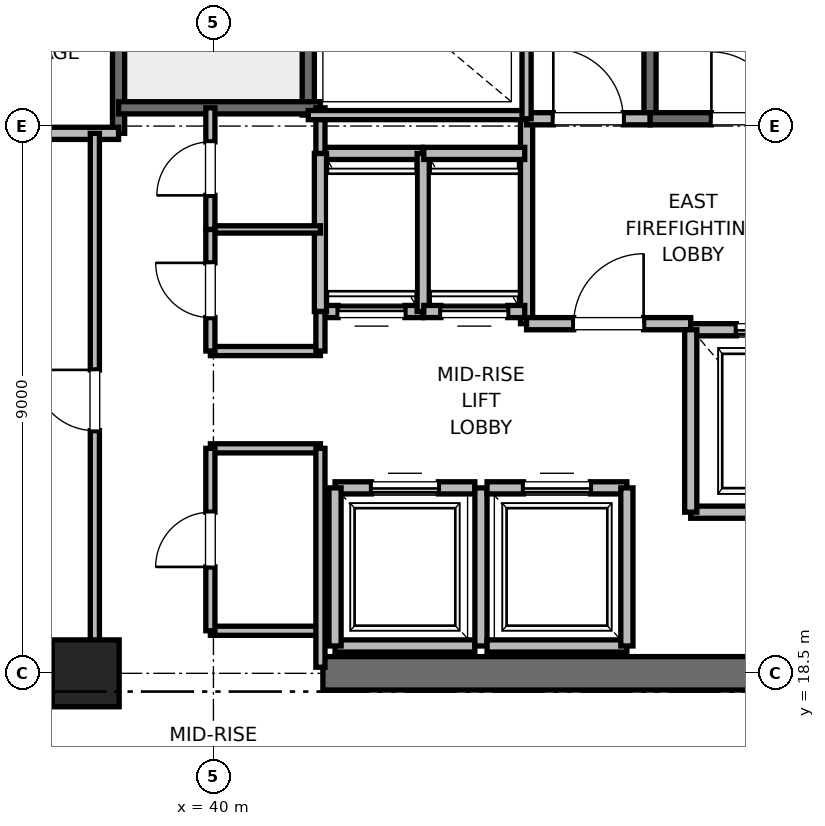
"""IFC4 building model, lengths in metres.
Left out: names, types, materials, properties, quantities, classifications, styles, units other than length and angle.
Written with IfcOpenShell. Run it as: python <this file> out.ifc"""

import sys

from ifc_helpers import new_model, si_unit, direction, frame, frame_2d, origin, origin_2d, place, context, subcontext, project, spatial, rectangle, extrude, element, fill, save


model = new_model("IFC4")
c1 = context("Model", 3, precision=1e-05, world=origin(), true_north=direction((0.0, 1.0)))
c2 = subcontext(c1, "Body", "Model", "MODEL_VIEW")
j1 = project(units=[si_unit("LENGTHUNIT", "METRE"), si_unit("PLANEANGLEUNIT", "RADIAN")], contexts=[c1])
p1 = place(None, origin())
s1 = spatial("IfcSite", under=j1, at=p1, CompositionType="ELEMENT")
p2 = place(p1, origin())
s2 = spatial("IfcBuilding", under=s1, at=p2, CompositionType="ELEMENT")
p3 = place(p2, frame((0.0, 0.0, 128.4)))
s3 = spatial("IfcBuildingStorey", under=s2, at=p3, CompositionType="ELEMENT", Elevation=128.4)
p4 = place(p3, frame((37.9, 18.5, 0.0), z_axis=(0.0, 0.0, 1.0), x_axis=(1.0, 0.0, 0.0)))
e1 = element("IfcColumn", 1, at=p4, inside=s3, PredefinedType="PILASTER", context=c2, shape_type="SweptSolid", body=[
    extrude(rectangle(XDim=1.1, YDim=1.1, at=origin_2d()), origin(), (0.0, 0.0, 1.0), 4.0),
])
for number, where, z_axis, x_axis in (
    (2, (29.0, 18.5, 0.0), (0.0, 0.0, 1.0), (1.0, 0.0, 0.0)),
    (3, (41.8, 18.5, 0.0), (0.0, 0.0, 1.0), (1.0, 0.0, 0.0)),
):
    element("IfcWall", number, at=place(p3, frame(where, z_axis=z_axis, x_axis=x_axis)), inside=s3, PredefinedType="SHEAR", context=c2, shape_type="SweptSolid", body=[
        extrude(rectangle(XDim=9.2, YDim=0.55, at=frame_2d((4.6, 0.0))), origin(), (0.0, 0.0, 1.0), 3.775),
    ])
p5 = place(p3, frame((47.18, 27.62, 0.0), z_axis=(0.0, 0.0, 1.0), x_axis=(0.0, 1.0, 0.0)))
e4 = element("IfcWall", 4, at=p5, inside=s3, PredefinedType="SOLIDWALL", context=c2, shape_type="SweptSolid", body=[
    extrude(rectangle(XDim=8.18, YDim=0.2, at=frame_2d((4.09, 0.0))), origin(), (0.0, 0.0, 1.0), 3.775),
])
p6 = place(p3, frame((47.18, 27.62, 0.0), z_axis=(0.0, 0.0, 1.0), x_axis=(1.0, 0.0, 0.0)))
e5 = element("IfcWall", 5, at=p6, inside=s3, PredefinedType="SOLIDWALL", context=c2, shape_type="SweptSolid", body=[
    extrude(rectangle(XDim=3.12, YDim=0.2, at=frame_2d((1.56, 0.0))), origin(), (0.0, 0.0, 1.0), 3.775),
])
p7 = place(p6, frame((1.01, 0.0, 0.0)))
e6 = element("IfcOpeningElement", 6, at=p7, cuts=e5, PredefinedType="OPENING", context=c2, shape_type="SweptSolid", body=[
    extrude(rectangle(XDim=1.1, YDim=2.15, at=frame_2d((0.55, 1.075))), frame((0.0, 0.1, 0.0), z_axis=(0.0, -1.0, 0.0), x_axis=(1.0, 0.0, 0.0)), (0.0, 0.0, 1.0), 0.2),
])
p8 = place(p3, frame((38.44, 27.38, 0.0), z_axis=(0.0, 0.0, 1.0), x_axis=(0.0, 1.0, 0.0)))
e7 = element("IfcWall", 7, at=p8, inside=s3, PredefinedType="SOLIDWALL", context=c2, shape_type="SweptSolid", body=[
    extrude(rectangle(XDim=8.87, YDim=0.2, at=frame_2d((4.435, 0.0))), origin(), (0.0, 0.0, 1.0), 3.775),
])
p9 = place(p3, frame((41.56, 27.68, 0.0), z_axis=(0.0, 0.0, 1.0), x_axis=(0.0, 1.0, 0.0)))
e8 = element("IfcWall", 8, at=p9, inside=s3, PredefinedType="SOLIDWALL", context=c2, shape_type="SweptSolid", body=[
    extrude(rectangle(XDim=8.57, YDim=0.2, at=frame_2d((4.285, 0.0))), origin(), (0.0, 0.0, 1.0), 3.775),
])
p10 = place(p3, frame((38.44, 27.8, 0.0), z_axis=(0.0, 0.0, 1.0), x_axis=(1.0, 0.0, 0.0)))
e9 = element("IfcWall", 9, at=p10, inside=s3, PredefinedType="SOLIDWALL", context=c2, shape_type="SweptSolid", body=[
    extrude(rectangle(XDim=3.32, YDim=0.2, at=frame_2d((1.66, 0.0))), origin(), (0.0, 0.0, 1.0), 3.775),
])
p11 = place(p3, frame((32.82, 27.38, 0.0), z_axis=(0.0, 0.0, 1.0), x_axis=(1.0, 0.0, 0.0)))
e10 = element("IfcWall", 10, at=p11, inside=s3, PredefinedType="PARTITIONING", context=c2, shape_type="SweptSolid", body=[
    extrude(rectangle(XDim=5.62, YDim=0.2, at=frame_2d((2.81, 0.0))), origin(), (0.0, 0.0, 1.0), 3.775),
])
p12 = place(p3, frame((45.15, 24.25, 0.0), z_axis=(0.0, 0.0, 1.0), x_axis=(0.0, 1.0, 0.0)))
e11 = element("IfcWall", 11, at=p12, inside=s3, PredefinedType="PARTITIONING", context=c2, shape_type="SweptSolid", body=[
    extrude(rectangle(XDim=3.37, YDim=0.2, at=frame_2d((1.685, 0.0))), origin(), (0.0, 0.0, 1.0), 3.775),
])
p13 = place(p3, frame((45.15, 24.25, 0.0), z_axis=(0.0, 0.0, 1.0), x_axis=(1.0, 0.0, 0.0)))
e12 = element("IfcWall", 12, at=p13, inside=s3, PredefinedType="PARTITIONING", context=c2, shape_type="SweptSolid", body=[
    extrude(rectangle(XDim=2.7, YDim=0.2, at=frame_2d((1.35, 0.0))), origin(), (0.0, 0.0, 1.0), 3.775),
])
p14 = place(p13, frame((0.775, 0.0, 0.0)))
e13 = element("IfcOpeningElement", 13, at=p14, cuts=e12, PredefinedType="OPENING", context=c2, shape_type="SweptSolid", body=[
    extrude(rectangle(XDim=1.15, YDim=2.2, at=frame_2d((0.575, 1.1))), frame((0.0, 0.1, 0.0), z_axis=(0.0, -1.0, 0.0), x_axis=(1.0, 0.0, 0.0)), (0.0, 0.0, 1.0), 0.2),
])
p15 = place(p3, frame((45.15, 27.62, 0.0), z_axis=(0.0, 0.0, 1.0), x_axis=(1.0, 0.0, 0.0)))
e14 = element("IfcWall", 14, at=p15, inside=s3, PredefinedType="PARTITIONING", context=c2, shape_type="SweptSolid", body=[
    extrude(rectangle(XDim=2.03, YDim=0.2, at=frame_2d((1.015, 0.0))), origin(), (0.0, 0.0, 1.0), 3.775),
])
p16 = place(p15, frame((0.44, 0.0, 0.0)))
e15 = element("IfcOpeningElement", 15, at=p16, cuts=e14, PredefinedType="OPENING", context=c2, shape_type="SweptSolid", body=[
    extrude(rectangle(XDim=1.15, YDim=2.2, at=frame_2d((0.575, 1.1))), frame((0.0, 0.1, 0.0), z_axis=(0.0, -1.0, 0.0), x_axis=(1.0, 0.0, 0.0)), (0.0, 0.0, 1.0), 0.2),
])
p17 = place(p3, frame((47.85, 21.15, 0.0), z_axis=(0.0, 0.0, 1.0), x_axis=(1.0, 0.0, 0.0)))
e16 = element("IfcWall", 16, at=p17, inside=s3, PredefinedType="SOLIDWALL", context=c2, shape_type="SweptSolid", body=[
    extrude(rectangle(XDim=2.6, YDim=0.2, at=frame_2d((1.3, 0.0))), origin(), (0.0, 0.0, 1.0), 3.775),
])
p18 = place(p3, frame((50.45, 24.15, 0.0), z_axis=(0.0, 0.0, 1.0), x_axis=(-1.0, 0.0, 0.0)))
e17 = element("IfcWall", 17, at=p18, inside=s3, PredefinedType="SOLIDWALL", context=c2, shape_type="SweptSolid", body=[
    extrude(rectangle(XDim=2.6, YDim=0.2, at=frame_2d((1.3, 0.0))), origin(), (0.0, 0.0, 1.0), 2.755),
])
p19 = place(p18, frame((0.75, 0.0, 0.0)))
e18 = element("IfcOpeningElement", 18, at=p19, cuts=e17, PredefinedType="OPENING", context=c2, shape_type="SweptSolid", body=[
    extrude(rectangle(XDim=1.1, YDim=2.2, at=frame_2d((0.55, 1.1))), frame((0.0, 0.1, 0.0), z_axis=(0.0, -1.0, 0.0), x_axis=(1.0, 0.0, 0.0)), (0.0, 0.0, 1.0), 0.2),
])
p20 = place(p3, frame((47.85, 24.15, 0.0), z_axis=(0.0, 0.0, 1.0), x_axis=(0.0, -1.0, 0.0)))
e19 = element("IfcWall", 19, at=p20, inside=s3, PredefinedType="SOLIDWALL", context=c2, shape_type="SweptSolid", body=[
    extrude(rectangle(XDim=3.0, YDim=0.2, at=frame_2d((1.5, 0.0))), origin(), (0.0, 0.0, 1.0), 3.775),
])
p21 = place(p3, frame((42.0, 18.95, 0.0), z_axis=(0.0, 0.0, 1.0), x_axis=(1.0, 0.0, 0.0)))
e20 = element("IfcWall", 20, at=p21, inside=s3, PredefinedType="SOLIDWALL", context=c2, shape_type="SweptSolid", body=[
    extrude(rectangle(XDim=2.3, YDim=0.2, at=frame_2d((1.15, 0.0))), origin(), (0.0, 0.0, 1.0), 2.755),
])
p22 = place(p3, frame((44.3, 21.55, 0.0), z_axis=(0.0, 0.0, 1.0), x_axis=(-1.0, 0.0, 0.0)))
e21 = element("IfcWall", 21, at=p22, inside=s3, PredefinedType="SOLIDWALL", context=c2, shape_type="SweptSolid", body=[
    extrude(rectangle(XDim=2.3, YDim=0.2, at=frame_2d((1.15, 0.0))), origin(), (0.0, 0.0, 1.0), 3.775),
])
p23 = place(p22, frame((0.6, 0.0, 0.0)))
e22 = element("IfcOpeningElement", 22, at=p23, cuts=e21, PredefinedType="OPENING", context=c2, shape_type="SweptSolid", body=[
    extrude(rectangle(XDim=1.1, YDim=2.2, at=frame_2d((0.55, 1.1))), frame((0.0, 0.1, 0.0), z_axis=(0.0, -1.0, 0.0), x_axis=(1.0, 0.0, 0.0)), (0.0, 0.0, 1.0), 0.2),
])
p24 = place(p3, frame((42.0, 21.55, 0.0), z_axis=(0.0, 0.0, 1.0), x_axis=(0.0, -1.0, 0.0)))
e23 = element("IfcWall", 23, at=p24, inside=s3, PredefinedType="SOLIDWALL", context=c2, shape_type="SweptSolid", body=[
    extrude(rectangle(XDim=2.6, YDim=0.2, at=frame_2d((1.3, 0.0))), origin(), (0.0, 0.0, 1.0), 2.755),
])
p25 = place(p3, frame((44.4, 18.95, 0.0), z_axis=(0.0, 0.0, 1.0), x_axis=(0.0, 1.0, 0.0)))
e24 = element("IfcWall", 24, at=p25, inside=s3, PredefinedType="SOLIDWALL", context=c2, shape_type="SweptSolid", body=[
    extrude(rectangle(XDim=2.6, YDim=0.2, at=frame_2d((1.3, 0.0))), origin(), (0.0, 0.0, 1.0), 3.775),
])
p26 = place(p3, frame((44.5, 18.95, 0.0), z_axis=(0.0, 0.0, 1.0), x_axis=(1.0, 0.0, 0.0)))
e25 = element("IfcWall", 25, at=p26, inside=s3, PredefinedType="SOLIDWALL", context=c2, shape_type="SweptSolid", body=[
    extrude(rectangle(XDim=2.3, YDim=0.2, at=frame_2d((1.15, 0.0))), origin(), (0.0, 0.0, 1.0), 3.775),
])
p27 = place(p3, frame((46.8, 21.55, 0.0), z_axis=(0.0, 0.0, 1.0), x_axis=(-1.0, 0.0, 0.0)))
e26 = element("IfcWall", 26, at=p27, inside=s3, PredefinedType="SOLIDWALL", context=c2, shape_type="SweptSolid", body=[
    extrude(rectangle(XDim=2.3, YDim=0.2, at=frame_2d((1.15, 0.0))), origin(), (0.0, 0.0, 1.0), 3.775),
])
p28 = place(p27, frame((0.6, 0.0, 0.0)))
e27 = element("IfcOpeningElement", 27, at=p28, cuts=e26, PredefinedType="OPENING", context=c2, shape_type="SweptSolid", body=[
    extrude(rectangle(XDim=1.1, YDim=2.2, at=frame_2d((0.55, 1.1))), frame((0.0, 0.1, 0.0), z_axis=(0.0, -1.0, 0.0), x_axis=(1.0, 0.0, 0.0)), (0.0, 0.0, 1.0), 0.2),
])
p29 = place(p3, frame((46.8, 18.95, 0.0), z_axis=(0.0, 0.0, 1.0), x_axis=(0.0, 1.0, 0.0)))
e28 = element("IfcWall", 28, at=p29, inside=s3, PredefinedType="SOLIDWALL", context=c2, shape_type="SweptSolid", body=[
    extrude(rectangle(XDim=2.6, YDim=0.2, at=frame_2d((1.3, 0.0))), origin(), (0.0, 0.0, 1.0), 3.775),
])
p30 = place(p3, frame((41.76, 24.45, 0.0), z_axis=(0.0, 0.0, 1.0), x_axis=(1.0, 0.0, 0.0)))
e29 = element("IfcWall", 29, at=p30, inside=s3, PredefinedType="SOLIDWALL", context=c2, shape_type="SweptSolid", body=[
    extrude(rectangle(XDim=1.68, YDim=0.2, at=frame_2d((0.84, 0.0))), origin(), (0.0, 0.0, 1.0), 3.775),
])
p31 = place(p30, frame((0.29, 0.0, 0.0)))
e30 = element("IfcOpeningElement", 30, at=p31, cuts=e29, PredefinedType="OPENING", context=c2, shape_type="SweptSolid", body=[
    extrude(rectangle(XDim=1.1, YDim=2.2, at=frame_2d((0.55, 1.1))), frame((0.0, 0.1, 0.0), z_axis=(0.0, -1.0, 0.0), x_axis=(1.0, 0.0, 0.0)), (0.0, 0.0, 1.0), 0.2),
])
p32 = place(p3, frame((43.44, 27.05, 0.0), z_axis=(0.0, 0.0, 1.0), x_axis=(-1.0, 0.0, 0.0)))
e31 = element("IfcWall", 31, at=p32, inside=s3, PredefinedType="SOLIDWALL", context=c2, shape_type="SweptSolid", body=[
    extrude(rectangle(XDim=1.68, YDim=0.2, at=frame_2d((0.84, 0.0))), origin(), (0.0, 0.0, 1.0), 3.775),
])
for number, where, z_axis, x_axis in (
    (32, (41.76, 27.05, 0.0), (0.0, 0.0, 1.0), (0.0, -1.0, 0.0)),
    (33, (43.45, 24.45, 0.0), (0.0, 0.0, 1.0), (0.0, 1.0, 0.0)),
):
    element("IfcWall", number, at=place(p3, frame(where, z_axis=z_axis, x_axis=x_axis)), inside=s3, PredefinedType="SOLIDWALL", context=c2, shape_type="SweptSolid", body=[
        extrude(rectangle(XDim=2.6, YDim=0.2, at=frame_2d((1.3, 0.0))), origin(), (0.0, 0.0, 1.0), 3.775),
    ])
p33 = place(p3, frame((43.46, 24.45, 0.0), z_axis=(0.0, 0.0, 1.0), x_axis=(1.0, 0.0, 0.0)))
e34 = element("IfcWall", 34, at=p33, inside=s3, PredefinedType="SOLIDWALL", context=c2, shape_type="SweptSolid", body=[
    extrude(rectangle(XDim=1.66, YDim=0.2, at=frame_2d((0.83, 0.0))), origin(), (0.0, 0.0, 1.0), 3.775),
])
p34 = place(p33, frame((0.28, 0.0, 0.0)))
e35 = element("IfcOpeningElement", 35, at=p34, cuts=e34, PredefinedType="OPENING", context=c2, shape_type="SweptSolid", body=[
    extrude(rectangle(XDim=1.1, YDim=2.2, at=frame_2d((0.55, 1.1))), frame((0.0, 0.1, 0.0), z_axis=(0.0, -1.0, 0.0), x_axis=(1.0, 0.0, 0.0)), (0.0, 0.0, 1.0), 0.2),
])
p35 = place(p3, frame((45.12, 27.05, 0.0), z_axis=(0.0, 0.0, 1.0), x_axis=(-1.0, 0.0, 0.0)))
e36 = element("IfcWall", 36, at=p35, inside=s3, PredefinedType="SOLIDWALL", context=c2, shape_type="SweptSolid", body=[
    extrude(rectangle(XDim=1.66, YDim=0.2, at=frame_2d((0.83, 0.0))), origin(), (0.0, 0.0, 1.0), 3.775),
])
for number, where, z_axis, x_axis in (
    (37, (39.95, 19.2, 0.0), (0.0, 0.0, 1.0), (1.0, 0.0, 0.0)),
    (38, (39.95, 22.2, 0.0), (0.0, 0.0, 1.0), (1.0, 0.0, 0.0)),
    (39, (39.95, 23.8, 0.0), (0.0, 0.0, 1.0), (1.0, 0.0, 0.0)),
):
    element("IfcWall", number, at=place(p3, frame(where, z_axis=z_axis, x_axis=x_axis)), inside=s3, PredefinedType="PARTITIONING", context=c2, shape_type="SweptSolid", body=[
        extrude(rectangle(XDim=1.81, YDim=0.15, at=frame_2d((0.905, 0.0))), origin(), (0.0, 0.0, 1.0), 2.85),
    ])
p36 = place(p3, frame((39.95, 25.8, 0.0), z_axis=(0.0, 0.0, 1.0), x_axis=(1.0, 0.0, 0.0)))
e40 = element("IfcWall", 40, at=p36, inside=s3, PredefinedType="PARTITIONING", context=c2, shape_type="SweptSolid", body=[
    extrude(rectangle(XDim=1.81, YDim=0.12, at=frame_2d((0.905, 0.0))), origin(), (0.0, 0.0, 1.0), 2.85),
])
p37 = place(p3, frame((41.76, 18.6, 0.0), z_axis=(0.0, 0.0, 1.0), x_axis=(0.0, 1.0, 0.0)))
e41 = element("IfcWall", 41, at=p37, inside=s3, PredefinedType="PARTITIONING", context=c2, shape_type="SweptSolid", body=[
    extrude(rectangle(XDim=3.6, YDim=0.15, at=frame_2d((1.8, 0.0))), origin(), (0.0, 0.0, 1.0), 2.755),
])
p38 = place(p3, frame((41.76, 23.8, 0.0), z_axis=(0.0, 0.0, 1.0), x_axis=(0.0, 1.0, 0.0)))
e42 = element("IfcWall", 42, at=p38, inside=s3, PredefinedType="PARTITIONING", context=c2, shape_type="SweptSolid", body=[
    extrude(rectangle(XDim=0.65, YDim=0.15, at=frame_2d((0.325, 0.0))), origin(), (0.0, 0.0, 1.0), 2.85),
])
p39 = place(p3, frame((41.76, 27.05, 0.0), z_axis=(0.0, 0.0, 1.0), x_axis=(0.0, 1.0, 0.0)))
e43 = element("IfcWall", 43, at=p39, inside=s3, PredefinedType="PARTITIONING", context=c2, shape_type="SweptSolid", body=[
    extrude(rectangle(XDim=0.75, YDim=0.15, at=frame_2d((0.375, 0.0))), origin(), (0.0, 0.0, 1.0), 2.85),
])
p40 = place(p3, frame((39.95, 19.2, 0.0), z_axis=(0.0, 0.0, 1.0), x_axis=(0.0, 1.0, 0.0)))
e44 = element("IfcWall", 44, at=p40, inside=s3, PredefinedType="PARTITIONING", context=c2, shape_type="SweptSolid", body=[
    extrude(rectangle(XDim=3.0, YDim=0.15, at=frame_2d((1.5, 0.0))), origin(), (0.0, 0.0, 1.0), 2.85),
])
p41 = place(p40, frame((1.05, 0.0, 0.0)))
e45 = element("IfcOpeningElement", 45, at=p41, cuts=e44, PredefinedType="OPENING", context=c2, shape_type="SweptSolid", body=[
    extrude(rectangle(XDim=0.9, YDim=2.1, at=frame_2d((0.45, 1.05))), frame((0.0, 0.075, 0.0), z_axis=(0.0, -1.0, 0.0), x_axis=(1.0, 0.0, 0.0)), (0.0, 0.0, 1.0), 0.15),
])
p42 = place(p3, frame((39.95, 23.8, 0.0), z_axis=(0.0, 0.0, 1.0), x_axis=(0.0, 1.0, 0.0)))
e46 = element("IfcWall", 46, at=p42, inside=s3, PredefinedType="PARTITIONING", context=c2, shape_type="SweptSolid", body=[
    extrude(rectangle(XDim=2.0, YDim=0.15, at=frame_2d((1.0, 0.0))), origin(), (0.0, 0.0, 1.0), 2.85),
])
p43 = place(p42, frame((0.55, 0.0, 0.0)))
e47 = element("IfcOpeningElement", 47, at=p43, cuts=e46, PredefinedType="OPENING", context=c2, shape_type="SweptSolid", body=[
    extrude(rectangle(XDim=0.9, YDim=2.1, at=frame_2d((0.45, 1.05))), frame((0.0, 0.075, 0.0), z_axis=(0.0, -1.0, 0.0), x_axis=(1.0, 0.0, 0.0)), (0.0, 0.0, 1.0), 0.15),
])
p44 = place(p3, frame((39.95, 25.8, 0.0), z_axis=(0.0, 0.0, 1.0), x_axis=(0.0, 1.0, 0.0)))
e48 = element("IfcWall", 48, at=p44, inside=s3, PredefinedType="PARTITIONING", context=c2, shape_type="SweptSolid", body=[
    extrude(rectangle(XDim=2.0, YDim=0.15, at=frame_2d((1.0, 0.0))), origin(), (0.0, 0.0, 1.0), 2.85),
])
p45 = place(p44, frame((0.56, 0.0, 0.0)))
e49 = element("IfcOpeningElement", 49, at=p45, cuts=e48, PredefinedType="OPENING", context=c2, shape_type="SweptSolid", body=[
    extrude(rectangle(XDim=0.88, YDim=2.1, at=frame_2d((0.44, 1.05))), frame((0.0, 0.075, 0.0), z_axis=(0.0, -1.0, 0.0), x_axis=(1.0, 0.0, 0.0)), (0.0, 0.0, 1.0), 0.15),
])
p46 = place(p3, frame((38.05, 18.6, 0.0), z_axis=(0.0, 0.0, 1.0), x_axis=(0.0, 1.0, 0.0)))
e50 = element("IfcWall", 50, at=p46, inside=s3, PredefinedType="PARTITIONING", context=c2, shape_type="SweptSolid", body=[
    extrude(rectangle(XDim=8.78, YDim=0.15, at=frame_2d((4.39, 0.0))), origin(), (0.0, 0.0, 1.0), 2.755),
])
p47 = place(p46, frame((3.89, 0.0, 0.0)))
e51 = element("IfcOpeningElement", 51, at=p47, cuts=e50, PredefinedType="OPENING", context=c2, shape_type="SweptSolid", body=[
    extrude(rectangle(XDim=1.0, YDim=2.15, at=frame_2d((0.5, 1.075))), frame((0.0, 0.075, 0.0), z_axis=(0.0, -1.0, 0.0), x_axis=(1.0, 0.0, 0.0)), (0.0, 0.0, 1.0), 0.15),
])
p48 = place(p3, frame((41.56, 27.68, 0.0), z_axis=(0.0, 0.0, 1.0), x_axis=(1.0, 0.0, 0.0)))
e52 = element("IfcWall", 52, at=p48, inside=s3, PredefinedType="PARTITIONING", context=c2, shape_type="SweptSolid", body=[
    extrude(rectangle(XDim=3.59, YDim=0.15, at=frame_2d((1.795, 0.0))), origin(), (0.0, 0.0, 1.0), 2.85),
])
p49 = place(p3, frame((45.15, 27.62, 0.0), z_axis=(0.0, 0.0, 1.0), x_axis=(0.0, 1.0, 0.0)))
e53 = element("IfcWall", 53, at=p49, inside=s3, PredefinedType="PARTITIONING", context=c2, shape_type="SweptSolid", body=[
    extrude(rectangle(XDim=3.1, YDim=0.15, at=frame_2d((1.55, 0.0))), origin(), (0.0, 0.0, 1.0), 2.85),
])
p50 = place(p7, origin())
e54 = element("IfcDoor", 54, at=p50, inside=s3, OperationType="SINGLE_SWING_LEFT", PredefinedType="DOOR", context=c2, shape_type="SweptSolid", body=[
    extrude(rectangle(XDim=1.1, YDim=2.15, at=frame_2d((0.55, 1.075))), frame((0.0, 0.025, 0.0), z_axis=(0.0, -1.0, 0.0), x_axis=(1.0, 0.0, 0.0)), (0.0, 0.0, 1.0), 0.05),
])
fill(e6, e54)
p51 = place(p14, origin())
e55 = element("IfcDoor", 55, at=p51, inside=s3, OperationType="SINGLE_SWING_RIGHT", PredefinedType="DOOR", context=c2, shape_type="SweptSolid", body=[
    extrude(rectangle(XDim=1.15, YDim=2.2, at=frame_2d((0.575, 1.1))), frame((0.0, 0.025, 0.0), z_axis=(0.0, -1.0, 0.0), x_axis=(1.0, 0.0, 0.0)), (0.0, 0.0, 1.0), 0.05),
])
fill(e13, e55)
p52 = place(p16, origin())
e56 = element("IfcDoor", 56, at=p52, inside=s3, OperationType="SINGLE_SWING_LEFT", PredefinedType="DOOR", context=c2, shape_type="SweptSolid", body=[
    extrude(rectangle(XDim=1.15, YDim=2.2, at=frame_2d((0.575, 1.1))), frame((0.0, 0.025, 0.0), z_axis=(0.0, -1.0, 0.0), x_axis=(1.0, 0.0, 0.0)), (0.0, 0.0, 1.0), 0.05),
])
fill(e15, e56)
p53 = place(p19, origin())
e57 = element("IfcDoor", 57, at=p53, inside=s3, OperationType="SLIDING_TO_RIGHT", PredefinedType="DOOR", context=c2, shape_type="SweptSolid", body=[
    extrude(rectangle(XDim=1.1, YDim=2.2, at=frame_2d((0.55, 1.1))), frame((0.0, 0.025, 0.0), z_axis=(0.0, -1.0, 0.0), x_axis=(1.0, 0.0, 0.0)), (0.0, 0.0, 1.0), 0.05),
])
fill(e18, e57)
p54 = place(p23, origin())
e58 = element("IfcDoor", 58, at=p54, inside=s3, OperationType="SLIDING_TO_RIGHT", PredefinedType="DOOR", context=c2, shape_type="SweptSolid", body=[
    extrude(rectangle(XDim=1.1, YDim=2.2, at=frame_2d((0.55, 1.1))), frame((0.0, 0.025, 0.0), z_axis=(0.0, -1.0, 0.0), x_axis=(1.0, 0.0, 0.0)), (0.0, 0.0, 1.0), 0.05),
])
fill(e22, e58)
p55 = place(p28, origin())
e59 = element("IfcDoor", 59, at=p55, inside=s3, OperationType="SLIDING_TO_RIGHT", PredefinedType="DOOR", context=c2, shape_type="SweptSolid", body=[
    extrude(rectangle(XDim=1.1, YDim=2.2, at=frame_2d((0.55, 1.1))), frame((0.0, 0.025, 0.0), z_axis=(0.0, -1.0, 0.0), x_axis=(1.0, 0.0, 0.0)), (0.0, 0.0, 1.0), 0.05),
])
fill(e27, e59)
p56 = place(p31, origin())
e60 = element("IfcDoor", 60, at=p56, inside=s3, OperationType="SLIDING_TO_RIGHT", PredefinedType="DOOR", context=c2, shape_type="SweptSolid", body=[
    extrude(rectangle(XDim=1.1, YDim=2.2, at=frame_2d((0.55, 1.1))), frame((0.0, 0.025, 0.0), z_axis=(0.0, -1.0, 0.0), x_axis=(1.0, 0.0, 0.0)), (0.0, 0.0, 1.0), 0.05),
])
fill(e30, e60)
p57 = place(p34, origin())
e61 = element("IfcDoor", 61, at=p57, inside=s3, OperationType="SLIDING_TO_RIGHT", PredefinedType="DOOR", context=c2, shape_type="SweptSolid", body=[
    extrude(rectangle(XDim=1.1, YDim=2.2, at=frame_2d((0.55, 1.1))), frame((0.0, 0.025, 0.0), z_axis=(0.0, -1.0, 0.0), x_axis=(1.0, 0.0, 0.0)), (0.0, 0.0, 1.0), 0.05),
])
fill(e35, e61)
p58 = place(p41, origin())
e62 = element("IfcDoor", 62, at=p58, inside=s3, OperationType="SINGLE_SWING_LEFT", PredefinedType="DOOR", context=c2, shape_type="SweptSolid", body=[
    extrude(rectangle(XDim=0.9, YDim=2.1, at=frame_2d((0.45, 1.05))), frame((0.0, 0.025, 0.0), z_axis=(0.0, -1.0, 0.0), x_axis=(1.0, 0.0, 0.0)), (0.0, 0.0, 1.0), 0.05),
])
fill(e45, e62)
p59 = place(p43, origin())
e63 = element("IfcDoor", 63, at=p59, inside=s3, OperationType="SINGLE_SWING_RIGHT", PredefinedType="DOOR", context=c2, shape_type="SweptSolid", body=[
    extrude(rectangle(XDim=0.9, YDim=2.1, at=frame_2d((0.45, 1.05))), frame((0.0, 0.025, 0.0), z_axis=(0.0, -1.0, 0.0), x_axis=(1.0, 0.0, 0.0)), (0.0, 0.0, 1.0), 0.05),
])
fill(e47, e63)
p60 = place(p45, origin())
e64 = element("IfcDoor", 64, at=p60, inside=s3, OperationType="SINGLE_SWING_LEFT", PredefinedType="DOOR", context=c2, shape_type="SweptSolid", body=[
    extrude(rectangle(XDim=0.88, YDim=2.1, at=frame_2d((0.44, 1.05))), frame((0.0, 0.025, 0.0), z_axis=(0.0, -1.0, 0.0), x_axis=(1.0, 0.0, 0.0)), (0.0, 0.0, 1.0), 0.05),
])
fill(e49, e64)
p61 = place(p47, origin())
e65 = element("IfcDoor", 65, at=p61, inside=s3, OperationType="SINGLE_SWING_RIGHT", PredefinedType="DOOR", context=c2, shape_type="SweptSolid", body=[
    extrude(rectangle(XDim=1.0, YDim=2.15, at=frame_2d((0.5, 1.075))), frame((0.0, 0.025, 0.0), z_axis=(0.0, -1.0, 0.0), x_axis=(1.0, 0.0, 0.0)), (0.0, 0.0, 1.0), 0.05),
])
fill(e51, e65)
save(model, sys.argv[1])
